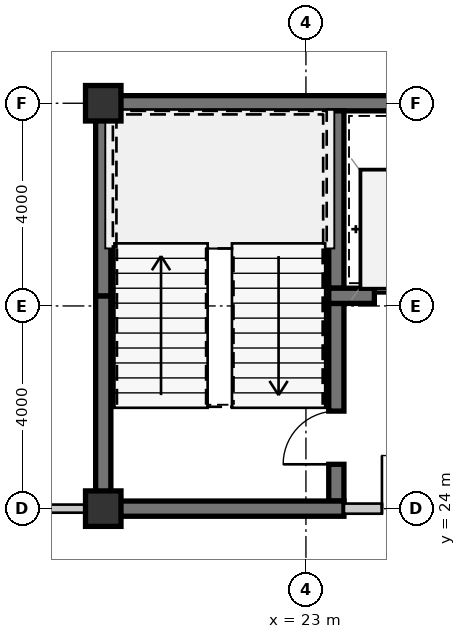
"""IFC4 building model, lengths in metres.
Left out: names, types, materials, properties, quantities, classifications, styles, units other than length and angle.
Written with IfcOpenShell. Run it as: python <this file> out.ifc"""

import sys

from ifc_helpers import new_model, si_unit, direction, frame, frame_2d, origin, origin_2d, place, context, subcontext, project, spatial, rectangle, extrude, source, transform, mapped, element, fill, save


model = new_model("IFC4")
c1 = context("Model", 3, precision=1e-05, world=origin(), true_north=direction((0.0, 1.0)))
c2 = subcontext(c1, "Body", "Model", "MODEL_VIEW")
j1 = project(units=[si_unit("LENGTHUNIT", "METRE"), si_unit("PLANEANGLEUNIT", "RADIAN")], contexts=[c1])
p1 = place(None, origin())
s1 = spatial("IfcSite", under=j1, at=p1, CompositionType="ELEMENT")
p2 = place(p1, origin())
s2 = spatial("IfcBuilding", under=s1, at=p2, CompositionType="ELEMENT")
p3 = place(p2, frame((0.0, 0.0, 74.55)))
s3 = spatial("IfcBuildingStorey", under=s2, at=p3, CompositionType="ELEMENT", Elevation=74.55)
m1 = source(origin(), c2, "Body", "SweptSolid", [
    extrude(rectangle(XDim=0.7, YDim=0.7, at=origin_2d()), origin(), (0.0, 0.0, 1.0), 3.15),
])
for number, where, z_axis, x_axis in (
    (1, (19.0, 24.0, 0.0), (0.0, 0.0, 1.0), (1.0, 0.0, 0.0)),
    (2, (19.0, 32.0, 0.0), (0.0, 0.0, 1.0), (1.0, 0.0, 0.0)),
):
    element("IfcColumn", number, at=place(p3, frame(where, z_axis=z_axis, x_axis=x_axis)), inside=s3, PredefinedType="COLUMN", context=c2, shape_type="MappedRepresentation", body=[
        mapped(m1, transform((0.0, 0.0, 0.0), scale=1.0)),
    ])
m2 = source(origin(), c2, "Body", "SweptSolid", [
    extrude(rectangle(XDim=9.15, YDim=0.3, at=frame_2d((4.575, 0.0))), origin(), (0.0, 0.0, 1.0), 2.93),
])
p4 = place(p3, frame((18.85, 32.0, 0.0), z_axis=(0.0, 0.0, 1.0), x_axis=(1.0, 0.0, 0.0)))
e3 = element("IfcWall", 3, at=p4, inside=s3, PredefinedType="SHEAR", context=c2, shape_type="MappedRepresentation", body=[
    mapped(m2, transform((0.0, 0.0, 0.0), scale=1.0)),
])
m3 = source(origin(), c2, "Body", "SweptSolid", [
    extrude(rectangle(XDim=4.05, YDim=0.3, at=frame_2d((2.025, 0.0))), origin(), (0.0, 0.0, 1.0), 2.93),
])
p5 = place(p3, frame((19.0, 24.15, 0.0), z_axis=(0.0, 0.0, 1.0), x_axis=(0.0, 1.0, 0.0)))
e4 = element("IfcWall", 4, at=p5, inside=s3, PredefinedType="SHEAR", context=c2, shape_type="MappedRepresentation", body=[
    mapped(m3, transform((0.0, 0.0, 0.0), scale=1.0)),
])
m4 = source(origin(), c2, "Body", "SweptSolid", [
    extrude(rectangle(XDim=3.65, YDim=0.3, at=frame_2d((1.825, 0.0))), origin(), (0.0, 0.0, 1.0), 2.93),
])
p6 = place(p3, frame((19.0, 28.2, 0.0), z_axis=(0.0, 0.0, 1.0), x_axis=(0.0, 1.0, 0.0)))
e5 = element("IfcWall", 5, at=p6, inside=s3, PredefinedType="SHEAR", context=c2, shape_type="MappedRepresentation", body=[
    mapped(m4, transform((0.0, 0.0, 0.0), scale=1.0)),
])
m5 = source(origin(), c2, "Body", "SweptSolid", [
    extrude(rectangle(XDim=3.5, YDim=0.3, at=frame_2d((1.75, 0.0))), origin(), (0.0, 0.0, 1.0), 2.93),
])
p7 = place(p3, frame((23.6, 28.35, 0.0), z_axis=(0.0, 0.0, 1.0), x_axis=(0.0, 1.0, 0.0)))
e6 = element("IfcWall", 6, at=p7, inside=s3, PredefinedType="SHEAR", context=c2, shape_type="MappedRepresentation", body=[
    mapped(m5, transform((0.0, 0.0, 0.0), scale=1.0)),
])
m6 = source(origin(), c2, "Body", "SweptSolid", [
    extrude(rectangle(XDim=3.9, YDim=0.3, at=frame_2d((1.95, 0.0))), origin(), (0.0, 0.0, 1.0), 2.93),
])
p8 = place(p3, frame((23.6, 24.15, 0.0), z_axis=(0.0, 0.0, 1.0), x_axis=(0.0, 1.0, 0.0)))
e7 = element("IfcWall", 7, at=p8, inside=s3, PredefinedType="SHEAR", context=c2, shape_type="MappedRepresentation", body=[
    mapped(m6, transform((0.0, 0.0, 0.0), scale=1.0)),
])
m7 = source(origin(), c2, "Body", "SweptSolid", [
    extrude(rectangle(XDim=1.05, YDim=2.1, at=frame_2d((0.525, 1.05))), frame((0.0, 0.16, 0.0), z_axis=(0.0, -1.0, 0.0), x_axis=(1.0, 0.0, 0.0)), (0.0, 0.0, 1.0), 0.32),
])
p9 = place(p8, frame((0.725, 0.0, 0.0)))
e8 = element("IfcOpeningElement", 8, at=p9, cuts=e7, PredefinedType="OPENING", context=c2, shape_type="MappedRepresentation", body=[
    mapped(m7, transform((0.0, 0.0, 0.0), scale=1.0)),
])
m8 = source(origin(), c2, "Body", "SweptSolid", [
    extrude(rectangle(XDim=4.9, YDim=0.3, at=frame_2d((2.45, 0.0))), origin(), (0.0, 0.0, 1.0), 2.93),
])
p10 = place(p3, frame((18.85, 24.0, 0.0), z_axis=(0.0, 0.0, 1.0), x_axis=(1.0, 0.0, 0.0)))
e9 = element("IfcWall", 9, at=p10, inside=s3, PredefinedType="SHEAR", context=c2, shape_type="MappedRepresentation", body=[
    mapped(m8, transform((0.0, 0.0, 0.0), scale=1.0)),
])
m9 = source(origin(), c2, "Body", "SweptSolid", [
    extrude(rectangle(XDim=2.9, YDim=0.3, at=frame_2d((1.45, 0.0))), origin(), (0.0, 0.0, 1.0), 2.93),
])
p11 = place(p3, frame((23.45, 28.2, 0.0), z_axis=(0.0, 0.0, 1.0), x_axis=(1.0, 0.0, 0.0)))
e10 = element("IfcWall", 10, at=p11, inside=s3, PredefinedType="SHEAR", context=c2, shape_type="MappedRepresentation", body=[
    mapped(m9, transform((0.0, 0.0, 0.0), scale=1.0)),
])
m10 = source(origin(), c2, "Body", "SweptSolid", [
    extrude(rectangle(XDim=1.1, YDim=2.15, at=frame_2d((0.55, 1.075))), frame((0.0, 0.16, 0.0), z_axis=(0.0, -1.0, 0.0), x_axis=(1.0, 0.0, 0.0)), (0.0, 0.0, 1.0), 0.32),
])
p12 = place(p11, frame((0.9, 0.0, 0.0)))
e11 = element("IfcOpeningElement", 11, at=p12, cuts=e10, PredefinedType="OPENING", context=c2, shape_type="MappedRepresentation", body=[
    mapped(m10, transform((0.0, 0.0, 0.0), scale=1.0)),
])
m11 = source(origin(), c2, "Body", "SweptSolid", [
    extrude(rectangle(XDim=2.7, YDim=0.2, at=frame_2d((1.35, 0.0))), origin(), (0.0, 0.0, 1.0), 2.47),
])
p13 = place(p3, frame((23.75, 24.0, 0.0), z_axis=(0.0, 0.0, 1.0), x_axis=(1.0, 0.0, 0.0)))
e12 = element("IfcWall", 12, at=p13, inside=s3, PredefinedType="SOLIDWALL", context=c2, shape_type="MappedRepresentation", body=[
    mapped(m11, transform((0.0, 0.0, 0.0), scale=1.0)),
])
m12 = source(origin(), c2, "Body", "SweptSolid", [
    extrude(rectangle(XDim=1.05, YDim=2.1, at=frame_2d((0.525, 1.05))), frame((0.0, 0.11, 0.0), z_axis=(0.0, -1.0, 0.0), x_axis=(1.0, 0.0, 0.0)), (0.0, 0.0, 1.0), 0.22),
])
p14 = place(p13, frame((0.75, 0.0, 0.0)))
e13 = element("IfcOpeningElement", 13, at=p14, cuts=e12, PredefinedType="OPENING", context=c2, shape_type="MappedRepresentation", body=[
    mapped(m12, transform((0.0, 0.0, 0.0), scale=1.0)),
])
m13 = source(origin(), c2, "Body", "SweptSolid", [
    extrude(rectangle(XDim=4.17, YDim=0.16, at=frame_2d((2.085, 0.0))), origin(), (0.0, 0.0, 1.0), 2.93),
])
p15 = place(p3, frame((14.68, 24.0, 0.0), z_axis=(0.0, 0.0, 1.0), x_axis=(1.0, 0.0, 0.0)))
e14 = element("IfcWall", 14, at=p15, inside=s3, PredefinedType="PARTITIONING", context=c2, shape_type="MappedRepresentation", body=[
    mapped(m13, transform((0.0, 0.0, 0.0), scale=1.0)),
])
m14 = source(origin(), c2, "Body", "SweptSolid", [
    extrude(rectangle(XDim=0.92, YDim=2.1, at=frame_2d((0.46, 1.05))), frame((0.0, 0.09, 0.0), z_axis=(0.0, -1.0, 0.0), x_axis=(1.0, 0.0, 0.0)), (0.0, 0.0, 1.0), 0.18),
])
p16 = place(p15, frame((1.69, 0.0, 0.0)))
e15 = element("IfcOpeningElement", 15, at=p16, cuts=e14, PredefinedType="OPENING", context=c2, shape_type="MappedRepresentation", body=[
    mapped(m14, transform((0.0, 0.0, 0.0), scale=1.0)),
])
m15 = source(origin(), c2, "Body", "SweptSolid", [
    extrude(rectangle(XDim=1.05, YDim=2.1, at=frame_2d((0.525, 1.05))), frame((0.0, 0.025, 0.0), z_axis=(0.0, -1.0, 0.0), x_axis=(1.0, 0.0, 0.0)), (0.0, 0.0, 1.0), 0.05),
])
p17 = place(p9, origin())
e16 = element("IfcDoor", 16, at=p17, inside=s3, OperationType="SINGLE_SWING_LEFT", PredefinedType="DOOR", context=c2, shape_type="MappedRepresentation", body=[
    mapped(m15, transform((0.0, 0.0, 0.0), scale=1.0)),
])
fill(e8, e16)
m16 = source(origin(), c2, "Body", "SweptSolid", [
    extrude(rectangle(XDim=1.1, YDim=2.15, at=frame_2d((0.55, 1.075))), frame((0.0, 0.025, 0.0), z_axis=(0.0, -1.0, 0.0), x_axis=(1.0, 0.0, 0.0)), (0.0, 0.0, 1.0), 0.05),
])
p18 = place(p12, origin())
e17 = element("IfcDoor", 17, at=p18, inside=s3, OperationType="SLIDING_TO_LEFT", PredefinedType="DOOR", context=c2, shape_type="MappedRepresentation", body=[
    mapped(m16, transform((0.0, 0.0, 0.0), scale=1.0)),
])
fill(e11, e17)
p19 = place(p14, origin())
e18 = element("IfcDoor", 18, at=p19, inside=s3, OperationType="SINGLE_SWING_LEFT", PredefinedType="DOOR", context=c2, shape_type="MappedRepresentation", body=[
    mapped(m15, transform((0.0, 0.0, 0.0), scale=1.0)),
])
fill(e13, e18)
save(model, sys.argv[1])
